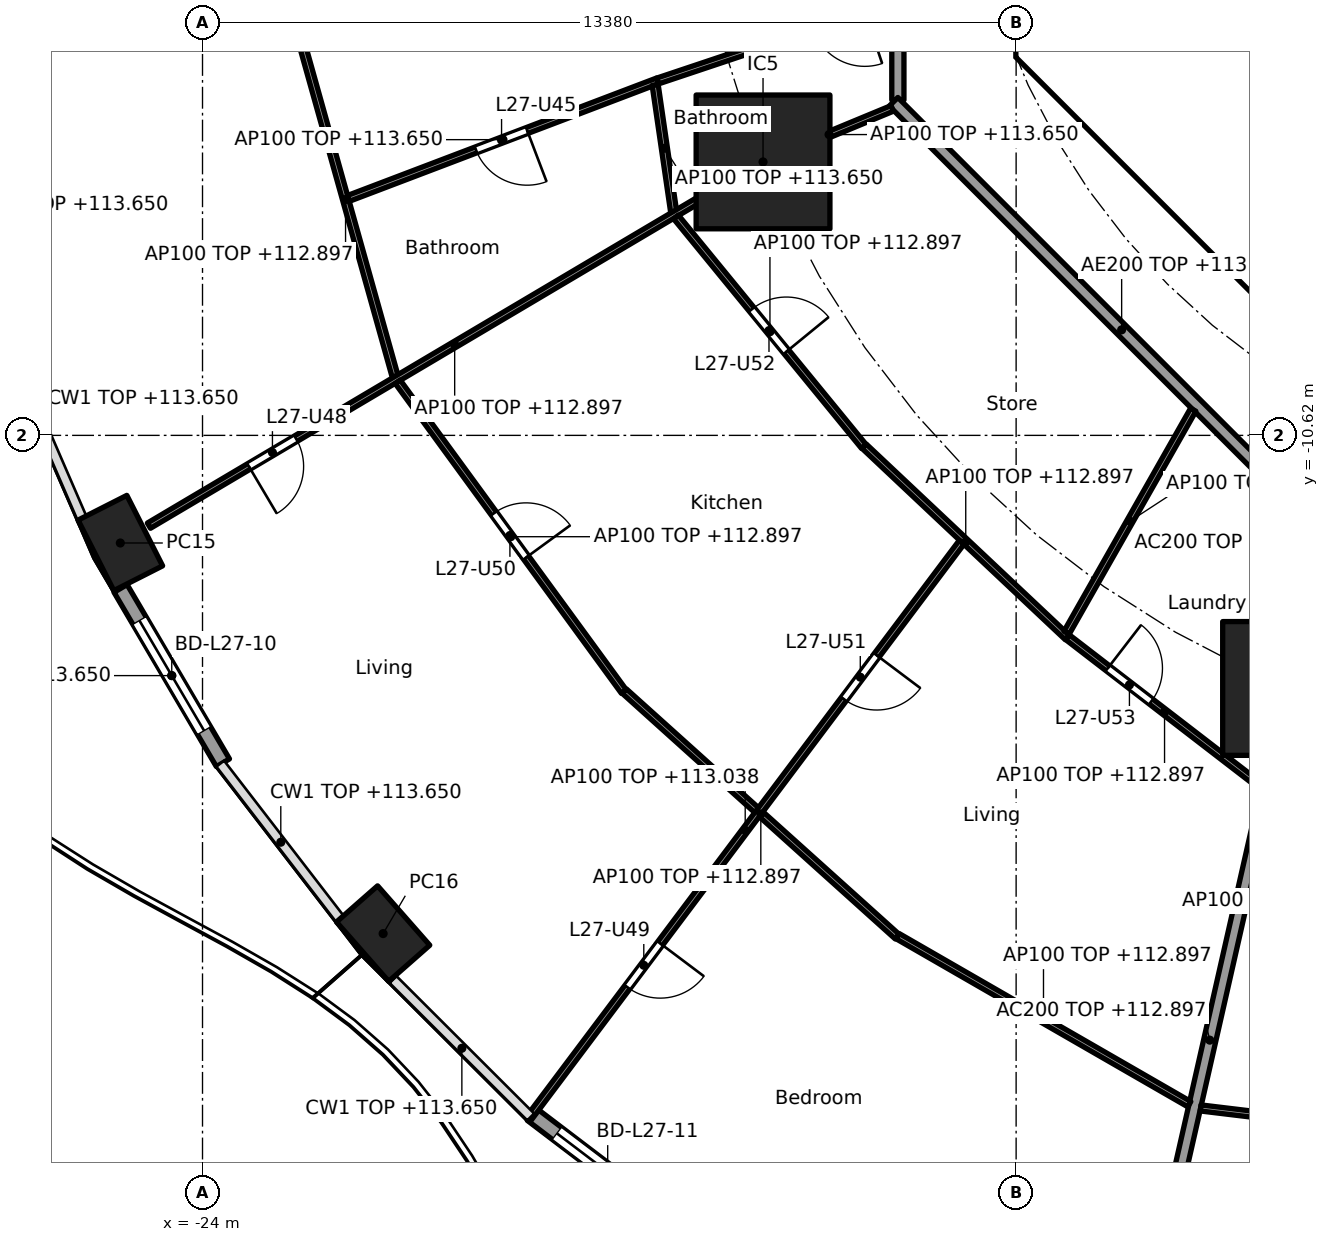
"""IFC4 building model, lengths in metres.
Left out: names, types, materials, properties, quantities, classifications, styles, units other than length and angle.
Written with IfcOpenShell. Run it as: python <this file> out.ifc"""

import sys

from ifc_helpers import new_model, si_unit, direction, frame, frame_2d, origin, origin_2d, place, context, subcontext, project, spatial, polyline, rectangle, hollow_rectangle, outline, extrude, element, fill, save


model = new_model("IFC4")
c1 = context("Model", 3, precision=1e-05, world=origin(), true_north=direction((0.0, 1.0)))
c2 = subcontext(c1, "Body", "Model", "MODEL_VIEW")
j1 = project(units=[si_unit("LENGTHUNIT", "METRE"), si_unit("PLANEANGLEUNIT", "RADIAN")], contexts=[c1])
p1 = place(None, origin())
s1 = spatial("IfcSite", under=j1, at=p1, CompositionType="ELEMENT")
p2 = place(p1, origin())
s2 = spatial("IfcBuilding", under=s1, at=p2, CompositionType="ELEMENT")
p3 = place(p2, frame((0.0, 0.0, 110.3)))
s3 = spatial("IfcBuildingStorey", under=s2, at=p3, CompositionType="ELEMENT", Elevation=110.3)
for number, where, z_axis, x_axis in (
    (1, (-25.352, -12.39, 0.0), (0.0, 0.0, 1.0), (0.452, -0.892, 0.0)),
    (2, (-21.03, -18.813, 0.0), (0.0, 0.0, 1.0), (0.66, -0.751, 0.0)),
):
    element("IfcColumn", number, at=place(p3, frame(where, z_axis=z_axis, x_axis=x_axis)), inside=s3, PredefinedType="COLUMN", context=c2, shape_type="SweptSolid", body=[
        extrude(hollow_rectangle(XDim=1.3, YDim=0.9, WallThickness=0.045, at=origin_2d()), origin(), (0.0, 0.0, 1.0), 3.7),
    ])
for number, where, z_axis, x_axis in (
    (3, (-14.782, -6.123, 0.0), (0.0, 0.0, 1.0), (1.0, 0.0, 0.0)),
    (4, (-6.123, -14.782, 0.0), (0.0, 0.0, 1.0), (1.0, 0.0, 0.0)),
):
    element("IfcColumn", number, at=place(p3, frame(where, z_axis=z_axis, x_axis=x_axis)), inside=s3, PredefinedType="COLUMN", context=c2, shape_type="SweptSolid", body=[
        extrude(rectangle(XDim=2.2, YDim=2.2, at=origin_2d()), origin(), (0.0, 0.0, 1.0), 3.7),
    ])
p4 = place(p3, frame((-23.664, -16.004, 0.0), z_axis=(0.0, 0.0, 1.0), x_axis=(-0.506352525095, 0.86232657406, 0.0)))
e5 = element("IfcWall", 5, at=p4, inside=s3, PredefinedType="SOLIDWALL", context=c2, shape_type="SweptSolid", body=[
    extrude(rectangle(XDim=3.325, YDim=0.25, at=frame_2d((1.663, 0.0))), origin(), (0.0, 0.0, 1.0), 3.35),
])
p5 = place(p4, frame((0.612, 0.0, 0.0)))
e6 = element("IfcOpeningElement", 6, at=p5, cuts=e5, PredefinedType="OPENING", context=c2, shape_type="SweptSolid", body=[
    extrude(rectangle(XDim=2.1, YDim=2.4, at=frame_2d((1.05, 1.2))), frame((0.0, 0.135, 0.0), z_axis=(0.0, -1.0, 0.0), x_axis=(1.0, 0.0, 0.0)), (0.0, 0.0, 1.0), 0.27),
])
p6 = place(p3, frame((-16.089, -23.682, 0.0), z_axis=(0.0, 0.0, 1.0), x_axis=(-0.796037575978, 0.605247203736, 0.0)))
e7 = element("IfcWall", 7, at=p6, inside=s3, PredefinedType="SOLIDWALL", context=c2, shape_type="SweptSolid", body=[
    extrude(rectangle(XDim=3.134, YDim=0.25, at=frame_2d((1.567, 0.0))), origin(), (0.0, 0.0, 1.0), 3.35),
])
p7 = place(p6, frame((0.517, 0.0, 0.0)))
e8 = element("IfcOpeningElement", 8, at=p7, cuts=e7, PredefinedType="OPENING", context=c2, shape_type="SweptSolid", body=[
    extrude(rectangle(XDim=2.1, YDim=2.4, at=frame_2d((1.05, 1.2))), frame((0.0, 0.135, 0.0), z_axis=(0.0, -1.0, 0.0), x_axis=(1.0, 0.0, 0.0)), (0.0, 0.0, 1.0), 0.27),
])
p8 = place(p3, frame((-9.988, -4.613, 0.0), z_axis=(0.0, 0.0, 1.0), x_axis=(0.707106781187, -0.707106781187, 0.0)))
e9 = element("IfcWall", 9, at=p8, inside=s3, PredefinedType="SHEAR", context=c2, shape_type="SweptSolid", body=[
    extrude(rectangle(XDim=7.602, YDim=0.6, at=frame_2d((3.801, 0.0))), origin(), (0.0, 0.0, 1.0), 3.35),
])
p9 = place(p8, frame((6.151, 0.0, 0.0)))
e10 = element("IfcOpeningElement", 10, at=p9, cuts=e9, PredefinedType="OPENING", context=c2, shape_type="SweptSolid", body=[
    extrude(rectangle(XDim=1.1, YDim=2.1, at=frame_2d((0.55, 1.05))), frame((0.0, 0.31, 0.0), z_axis=(0.0, -1.0, 0.0), x_axis=(1.0, 0.0, 0.0)), (0.0, 0.0, 1.0), 0.62),
])
p10 = place(p3, origin())
e11 = element("IfcWall", 11, at=p10, inside=s3, PredefinedType="SHEAR", context=c2, shape_type="SweptSolid", body=[
    extrude(outline(polyline([(-10.625, -3.801), (-10.025, -3.801), (-10.025, -4.152), (-9.776, -4.401), (-10.2, -4.825), (-10.625, -4.401), (-10.625, -3.801)])), origin(), (0.0, 0.0, 1.0), 3.35),
])
p11 = place(p3, frame((-8.001, -6.1, 0.0), z_axis=(0.0, 0.0, 1.0), x_axis=(1.0, 0.0, 0.0)))
e12 = element("IfcWall", 12, at=p11, inside=s3, PredefinedType="PARTITIONING", context=c2, shape_type="SweptSolid", body=[
    extrude(rectangle(XDim=2.126, YDim=0.15, at=frame_2d((1.063, 0.0))), origin(), (0.0, 0.0, 1.0), 3.35),
])
p12 = place(p3, frame((-6.134, -14.831, 0.0), z_axis=(0.0, 0.0, 1.0), x_axis=(-0.221225405869, -0.975222702667, 0.0)))
e13 = element("IfcWall", 13, at=p12, inside=s3, PredefinedType="PARTITIONING", context=c2, shape_type="SweptSolid", body=[
    extrude(rectangle(XDim=11.761, YDim=0.2, at=frame_2d((5.88, 0.0))), origin(), (0.0, 0.0, 1.0), 2.597),
])
p13 = place(p3, frame((-12.565, 5.304, 0.0), z_axis=(0.0, 0.0, 1.0), x_axis=(0.0, -1.0, 0.0)))
e14 = element("IfcWall", 14, at=p13, inside=s3, PredefinedType="PARTITIONING", context=c2, shape_type="SweptSolid", body=[
    extrude(rectangle(XDim=10.409, YDim=0.2, at=frame_2d((5.205, 0.0))), origin(), (0.0, 0.0, 1.0), 3.35),
])
p14 = place(p13, frame((6.539, 0.0, 0.0)))
e15 = element("IfcOpeningElement", 15, at=p14, cuts=e14, PredefinedType="OPENING", context=c2, shape_type="SweptSolid", body=[
    extrude(rectangle(XDim=1.0, YDim=2.1, at=frame_2d((0.5, 1.05))), frame((0.0, 0.11, 0.0), z_axis=(0.0, -1.0, 0.0), x_axis=(1.0, 0.0, 0.0)), (0.0, 0.0, 1.0), 0.22),
])
p15 = place(p3, frame((-12.635, -5.134, 0.0), z_axis=(0.0, 0.0, 1.0), x_axis=(0.707106781187, -0.707106781187, 0.0)))
e16 = element("IfcWall", 16, at=p15, inside=s3, PredefinedType="PARTITIONING", context=c2, shape_type="SweptSolid", body=[
    extrude(rectangle(XDim=10.609, YDim=0.2, at=frame_2d((5.305, 0.0))), origin(), (0.0, 0.0, 1.0), 3.35),
])
p16 = place(p3, frame((-22.463, -3.832, 0.0), z_axis=(0.0, 0.0, 1.0), x_axis=(0.269797759333, -0.962917010473, 0.0)))
e17 = element("IfcWall", 17, at=p16, inside=s3, PredefinedType="PARTITIONING", context=c2, shape_type="SweptSolid", body=[
    extrude(rectangle(XDim=6.043, YDim=0.1, at=frame_2d((3.021, 0.0))), origin(), (0.0, 0.0, 1.0), 2.597),
])
p17 = place(p3, frame((-12.66, -3.501, 0.0), z_axis=(0.0, 0.0, 1.0), x_axis=(-0.94826823584, -0.317470239387, 0.0)))
e18 = element("IfcWall", 18, at=p17, inside=s3, PredefinedType="PARTITIONING", context=c2, shape_type="SweptSolid", body=[
    extrude(rectangle(XDim=4.067, YDim=0.1, at=frame_2d((2.033, 0.0))), origin(), (0.0, 0.0, 1.0), 2.447),
])
p18 = place(p17, frame((0.473, 0.0, 0.0)))
e19 = element("IfcOpeningElement", 19, at=p18, cuts=e18, PredefinedType="OPENING", context=c2, shape_type="SweptSolid", body=[
    extrude(rectangle(XDim=0.9, YDim=2.1, at=frame_2d((0.45, 1.05))), frame((0.0, 0.06, 0.0), z_axis=(0.0, -1.0, 0.0), x_axis=(1.0, 0.0, 0.0)), (0.0, 0.0, 1.0), 0.12),
])
p19 = place(p3, frame((-16.517, -4.791, 0.0), z_axis=(0.0, 0.0, 1.0), x_axis=(-0.934746314445, -0.355315813933, 0.0)))
e20 = element("IfcWall", 20, at=p19, inside=s3, PredefinedType="PARTITIONING", context=c2, shape_type="SweptSolid", body=[
    extrude(rectangle(XDim=5.439, YDim=0.1, at=frame_2d((2.72, 0.0))), origin(), (0.0, 0.0, 1.0), 3.35),
])
p20 = place(p19, frame((2.295, 0.0, 0.0)))
e21 = element("IfcOpeningElement", 21, at=p20, cuts=e20, PredefinedType="OPENING", context=c2, shape_type="SweptSolid", body=[
    extrude(rectangle(XDim=0.9, YDim=2.1, at=frame_2d((0.45, 1.05))), frame((0.0, 0.06, 0.0), z_axis=(0.0, -1.0, 0.0), x_axis=(1.0, 0.0, 0.0)), (0.0, 0.0, 1.0), 0.12),
])
p21 = place(p3, frame((-16.556, -4.858, 0.0), z_axis=(0.0, 0.0, 1.0), x_axis=(0.144198032946, -0.989548850383, 0.0)))
e22 = element("IfcWall", 22, at=p21, inside=s3, PredefinedType="PARTITIONING", context=c2, shape_type="SweptSolid", body=[
    extrude(rectangle(XDim=2.104, YDim=0.1, at=frame_2d((1.052, 0.0))), origin(), (0.0, 0.0, 1.0), 3.35),
])
p22 = place(p3, frame((-12.657, -5.243, 0.0), z_axis=(0.0, 0.0, 1.0), x_axis=(-0.923848837015, -0.382757529444, 0.0)))
e23 = element("IfcWall", 23, at=p22, inside=s3, PredefinedType="PARTITIONING", context=c2, shape_type="SweptSolid", body=[
    extrude(rectangle(XDim=2.25, YDim=0.1, at=frame_2d((1.125, 0.0))), origin(), (0.0, 0.0, 1.0), 3.35),
])
p23 = place(p3, frame((-14.825, -6.148, 0.0), z_axis=(0.0, 0.0, 1.0), x_axis=(-0.860400431487, -0.509618580408, 0.0)))
e24 = element("IfcWall", 24, at=p23, inside=s3, PredefinedType="PARTITIONING", context=c2, shape_type="SweptSolid", body=[
    extrude(rectangle(XDim=11.688, YDim=0.1, at=frame_2d((5.844, 0.0))), origin(), (0.0, 0.0, 1.0), 2.597),
])
p24 = place(p23, frame((8.877, 0.0, 0.0)))
e25 = element("IfcOpeningElement", 25, at=p24, cuts=e24, PredefinedType="OPENING", context=c2, shape_type="SweptSolid", body=[
    extrude(rectangle(XDim=0.9, YDim=2.1, at=frame_2d((0.45, 1.05))), frame((0.0, 0.06, 0.0), z_axis=(0.0, -1.0, 0.0), x_axis=(1.0, 0.0, 0.0)), (0.0, 0.0, 1.0), 0.12),
])
p25 = place(p3, frame((-16.214, -7.028, 0.0), z_axis=(0.0, 0.0, 1.0), x_axis=(0.633412158846, -0.773814601197, 0.0)))
e26 = element("IfcWall", 26, at=p25, inside=s3, PredefinedType="PARTITIONING", context=c2, shape_type="SweptSolid", body=[
    extrude(rectangle(XDim=4.879, YDim=0.1, at=frame_2d((2.439, 0.0))), origin(), (0.0, 0.0, 1.0), 2.597),
])
p26 = place(p25, frame((1.965, 0.0, 0.0)))
e27 = element("IfcOpeningElement", 27, at=p26, cuts=e26, PredefinedType="OPENING", context=c2, shape_type="SweptSolid", body=[
    extrude(rectangle(XDim=0.9, YDim=2.1, at=frame_2d((0.45, 1.05))), frame((0.0, 0.06, 0.0), z_axis=(0.0, -1.0, 0.0), x_axis=(1.0, 0.0, 0.0)), (0.0, 0.0, 1.0), 0.12),
])
p27 = place(p3, frame((-20.79, -9.739, 0.0), z_axis=(0.0, 0.0, 1.0), x_axis=(0.589595343438, -0.807698787294, 0.0)))
e28 = element("IfcWall", 28, at=p27, inside=s3, PredefinedType="PARTITIONING", context=c2, shape_type="SweptSolid", body=[
    extrude(rectangle(XDim=6.308, YDim=0.1, at=frame_2d((3.154, 0.0))), origin(), (0.0, 0.0, 1.0), 2.597),
])
p28 = place(p27, frame((2.679, 0.0, 0.0)))
e29 = element("IfcOpeningElement", 29, at=p28, cuts=e28, PredefinedType="OPENING", context=c2, shape_type="SweptSolid", body=[
    extrude(rectangle(XDim=0.9, YDim=2.1, at=frame_2d((0.45, 1.05))), frame((0.0, 0.06, 0.0), z_axis=(0.0, -1.0, 0.0), x_axis=(1.0, 0.0, 0.0)), (0.0, 0.0, 1.0), 0.12),
])
p29 = place(p3, frame((-13.118, -10.8, 0.0), z_axis=(0.0, 0.0, 1.0), x_axis=(0.72818280142, -0.685382964273, 0.0)))
e30 = element("IfcWall", 30, at=p29, inside=s3, PredefinedType="PARTITIONING", context=c2, shape_type="SweptSolid", body=[
    extrude(rectangle(XDim=4.586, YDim=0.1, at=frame_2d((2.293, 0.0))), origin(), (0.0, 0.0, 1.0), 2.597),
])
p30 = place(p3, frame((-17.063, -14.827, 0.0), z_axis=(0.0, 0.0, 1.0), x_axis=(0.743485143578, -0.668752451419, 0.0)))
e31 = element("IfcWall", 31, at=p30, inside=s3, PredefinedType="PARTITIONING", context=c2, shape_type="SweptSolid", body=[
    extrude(rectangle(XDim=6.037, YDim=0.1, at=frame_2d((3.019, 0.0))), origin(), (0.0, 0.0, 1.0), 2.597),
])
p31 = place(p3, frame((-11.515, -12.377, 0.0), z_axis=(0.0, 0.0, 1.0), x_axis=(-0.600741245554, -0.799443528893, 0.0)))
e32 = element("IfcWall", 32, at=p31, inside=s3, PredefinedType="PARTITIONING", context=c2, shape_type="SweptSolid", body=[
    extrude(rectangle(XDim=11.853, YDim=0.1, at=frame_2d((5.927, 0.0))), origin(), (0.0, 0.0, 1.0), 2.738),
])
p32 = place(p31, frame((8.253, 0.0, 0.0)))
e33 = element("IfcOpeningElement", 33, at=p32, cuts=e32, PredefinedType="OPENING", context=c2, shape_type="SweptSolid", body=[
    extrude(rectangle(XDim=0.9, YDim=2.1, at=frame_2d((0.45, 1.05))), frame((0.0, 0.06, 0.0), z_axis=(0.0, -1.0, 0.0), x_axis=(1.0, 0.0, 0.0)), (0.0, 0.0, 1.0), 0.12),
])
p33 = place(p31, frame((2.326, 0.0, 0.0)))
e34 = element("IfcOpeningElement", 34, at=p33, cuts=e32, PredefinedType="OPENING", context=c2, shape_type="SweptSolid", body=[
    extrude(rectangle(XDim=0.9, YDim=2.1, at=frame_2d((0.45, 1.05))), frame((0.0, 0.06, 0.0), z_axis=(0.0, -1.0, 0.0), x_axis=(1.0, 0.0, 0.0)), (0.0, 0.0, 1.0), 0.12),
])
p34 = place(p3, frame((-7.707, -10.198, 0.0), z_axis=(0.0, 0.0, 1.0), x_axis=(-0.493986531217, -0.869469554945, 0.0)))
e35 = element("IfcWall", 35, at=p34, inside=s3, PredefinedType="PARTITIONING", context=c2, shape_type="SweptSolid", body=[
    extrude(rectangle(XDim=4.217, YDim=0.1, at=frame_2d((2.109, 0.0))), origin(), (0.0, 0.0, 1.0), 2.447),
])
p35 = place(p3, frame((-9.775, -13.939, 0.0), z_axis=(0.0, 0.0, 1.0), x_axis=(0.792162117554, -0.610310723741, 0.0)))
e36 = element("IfcWall", 36, at=p35, inside=s3, PredefinedType="PARTITIONING", context=c2, shape_type="SweptSolid", body=[
    extrude(rectangle(XDim=4.03, YDim=0.1, at=frame_2d((2.015, 0.0))), origin(), (0.0, 0.0, 1.0), 2.597),
])
p36 = place(p35, frame((0.836, 0.0, 0.0)))
e37 = element("IfcOpeningElement", 37, at=p36, cuts=e36, PredefinedType="OPENING", context=c2, shape_type="SweptSolid", body=[
    extrude(rectangle(XDim=0.9, YDim=2.1, at=frame_2d((0.45, 1.05))), frame((0.0, 0.06, 0.0), z_axis=(0.0, -1.0, 0.0), x_axis=(1.0, 0.0, 0.0)), (0.0, 0.0, 1.0), 0.12),
])
p37 = place(p3, frame((-12.568, -18.856, 0.0), z_axis=(0.0, 0.0, 1.0), x_axis=(0.866533437451, -0.499119025664, 0.0)))
e38 = element("IfcWall", 38, at=p37, inside=s3, PredefinedType="PARTITIONING", context=c2, shape_type="SweptSolid", body=[
    extrude(rectangle(XDim=5.535, YDim=0.1, at=frame_2d((2.768, 0.0))), origin(), (0.0, 0.0, 1.0), 2.597),
])
p38 = place(p3, frame((-7.586, -21.68, 0.0), z_axis=(0.0, 0.0, 1.0), x_axis=(0.992810535213, -0.119696454295, 0.0)))
e39 = element("IfcWall", 39, at=p38, inside=s3, PredefinedType="PARTITIONING", context=c2, shape_type="SweptSolid", body=[
    extrude(rectangle(XDim=5.903, YDim=0.1, at=frame_2d((2.951, 0.0))), origin(), (0.0, 0.0, 1.0), 2.597),
])
p39 = place(p38, frame((3.915, 0.0, 0.0)))
e40 = element("IfcOpeningElement", 40, at=p39, cuts=e39, PredefinedType="OPENING", context=c2, shape_type="SweptSolid", body=[
    extrude(rectangle(XDim=0.9, YDim=2.1, at=frame_2d((0.45, 1.05))), frame((0.0, 0.06, 0.0), z_axis=(0.0, -1.0, 0.0), x_axis=(1.0, 0.0, 0.0)), (0.0, 0.0, 1.0), 0.12),
])
p40 = place(p5, origin())
e41 = element("IfcDoor", 41, at=p40, inside=s3, OperationType="SLIDING_TO_LEFT", PredefinedType="DOOR", context=c2, shape_type="SweptSolid", body=[
    extrude(rectangle(XDim=2.1, YDim=2.4, at=frame_2d((1.05, 1.2))), frame((0.0, 0.025, 0.0), z_axis=(0.0, -1.0, 0.0), x_axis=(1.0, 0.0, 0.0)), (0.0, 0.0, 1.0), 0.05),
])
fill(e6, e41)
p41 = place(p7, origin())
e42 = element("IfcDoor", 42, at=p41, inside=s3, OperationType="SLIDING_TO_LEFT", PredefinedType="DOOR", context=c2, shape_type="SweptSolid", body=[
    extrude(rectangle(XDim=2.1, YDim=2.4, at=frame_2d((1.05, 1.2))), frame((0.0, 0.025, 0.0), z_axis=(0.0, -1.0, 0.0), x_axis=(1.0, 0.0, 0.0)), (0.0, 0.0, 1.0), 0.05),
])
fill(e8, e42)
p42 = place(p20, origin())
e43 = element("IfcDoor", 43, at=p42, inside=s3, OperationType="SINGLE_SWING_LEFT", PredefinedType="DOOR", context=c2, shape_type="SweptSolid", body=[
    extrude(rectangle(XDim=0.9, YDim=2.1, at=frame_2d((0.45, 1.05))), frame((0.0, 0.025, 0.0), z_axis=(0.0, -1.0, 0.0), x_axis=(1.0, 0.0, 0.0)), (0.0, 0.0, 1.0), 0.05),
])
fill(e21, e43)
p43 = place(p24, origin())
e44 = element("IfcDoor", 44, at=p43, inside=s3, OperationType="SINGLE_SWING_RIGHT", PredefinedType="DOOR", context=c2, shape_type="SweptSolid", body=[
    extrude(rectangle(XDim=0.9, YDim=2.1, at=frame_2d((0.45, 1.05))), frame((0.0, 0.025, 0.0), z_axis=(0.0, -1.0, 0.0), x_axis=(1.0, 0.0, 0.0)), (0.0, 0.0, 1.0), 0.05),
])
fill(e25, e44)
p44 = place(p32, origin())
e45 = element("IfcDoor", 45, at=p44, inside=s3, OperationType="SINGLE_SWING_LEFT", PredefinedType="DOOR", context=c2, shape_type="SweptSolid", body=[
    extrude(rectangle(XDim=0.9, YDim=2.1, at=frame_2d((0.45, 1.05))), frame((0.0, 0.025, 0.0), z_axis=(0.0, -1.0, 0.0), x_axis=(1.0, 0.0, 0.0)), (0.0, 0.0, 1.0), 0.05),
])
fill(e33, e45)
p45 = place(p28, origin())
e46 = element("IfcDoor", 46, at=p45, inside=s3, OperationType="SINGLE_SWING_RIGHT", PredefinedType="DOOR", context=c2, shape_type="SweptSolid", body=[
    extrude(rectangle(XDim=0.9, YDim=2.1, at=frame_2d((0.45, 1.05))), frame((0.0, 0.025, 0.0), z_axis=(0.0, -1.0, 0.0), x_axis=(1.0, 0.0, 0.0)), (0.0, 0.0, 1.0), 0.05),
])
fill(e29, e46)
p46 = place(p33, origin())
e47 = element("IfcDoor", 47, at=p46, inside=s3, OperationType="SINGLE_SWING_LEFT", PredefinedType="DOOR", context=c2, shape_type="SweptSolid", body=[
    extrude(rectangle(XDim=0.9, YDim=2.1, at=frame_2d((0.45, 1.05))), frame((0.0, 0.025, 0.0), z_axis=(0.0, -1.0, 0.0), x_axis=(1.0, 0.0, 0.0)), (0.0, 0.0, 1.0), 0.05),
])
fill(e34, e47)
p47 = place(p26, origin())
e48 = element("IfcDoor", 48, at=p47, inside=s3, OperationType="SINGLE_SWING_RIGHT", PredefinedType="DOOR", context=c2, shape_type="SweptSolid", body=[
    extrude(rectangle(XDim=0.9, YDim=2.1, at=frame_2d((0.45, 1.05))), frame((0.0, 0.025, 0.0), z_axis=(0.0, -1.0, 0.0), x_axis=(1.0, 0.0, 0.0)), (0.0, 0.0, 1.0), 0.05),
])
fill(e27, e48)
p48 = place(p36, origin())
e49 = element("IfcDoor", 49, at=p48, inside=s3, OperationType="SINGLE_SWING_LEFT", PredefinedType="DOOR", context=c2, shape_type="SweptSolid", body=[
    extrude(rectangle(XDim=0.9, YDim=2.1, at=frame_2d((0.45, 1.05))), frame((0.0, 0.025, 0.0), z_axis=(0.0, -1.0, 0.0), x_axis=(1.0, 0.0, 0.0)), (0.0, 0.0, 1.0), 0.05),
])
fill(e37, e49)
save(model, sys.argv[1])
